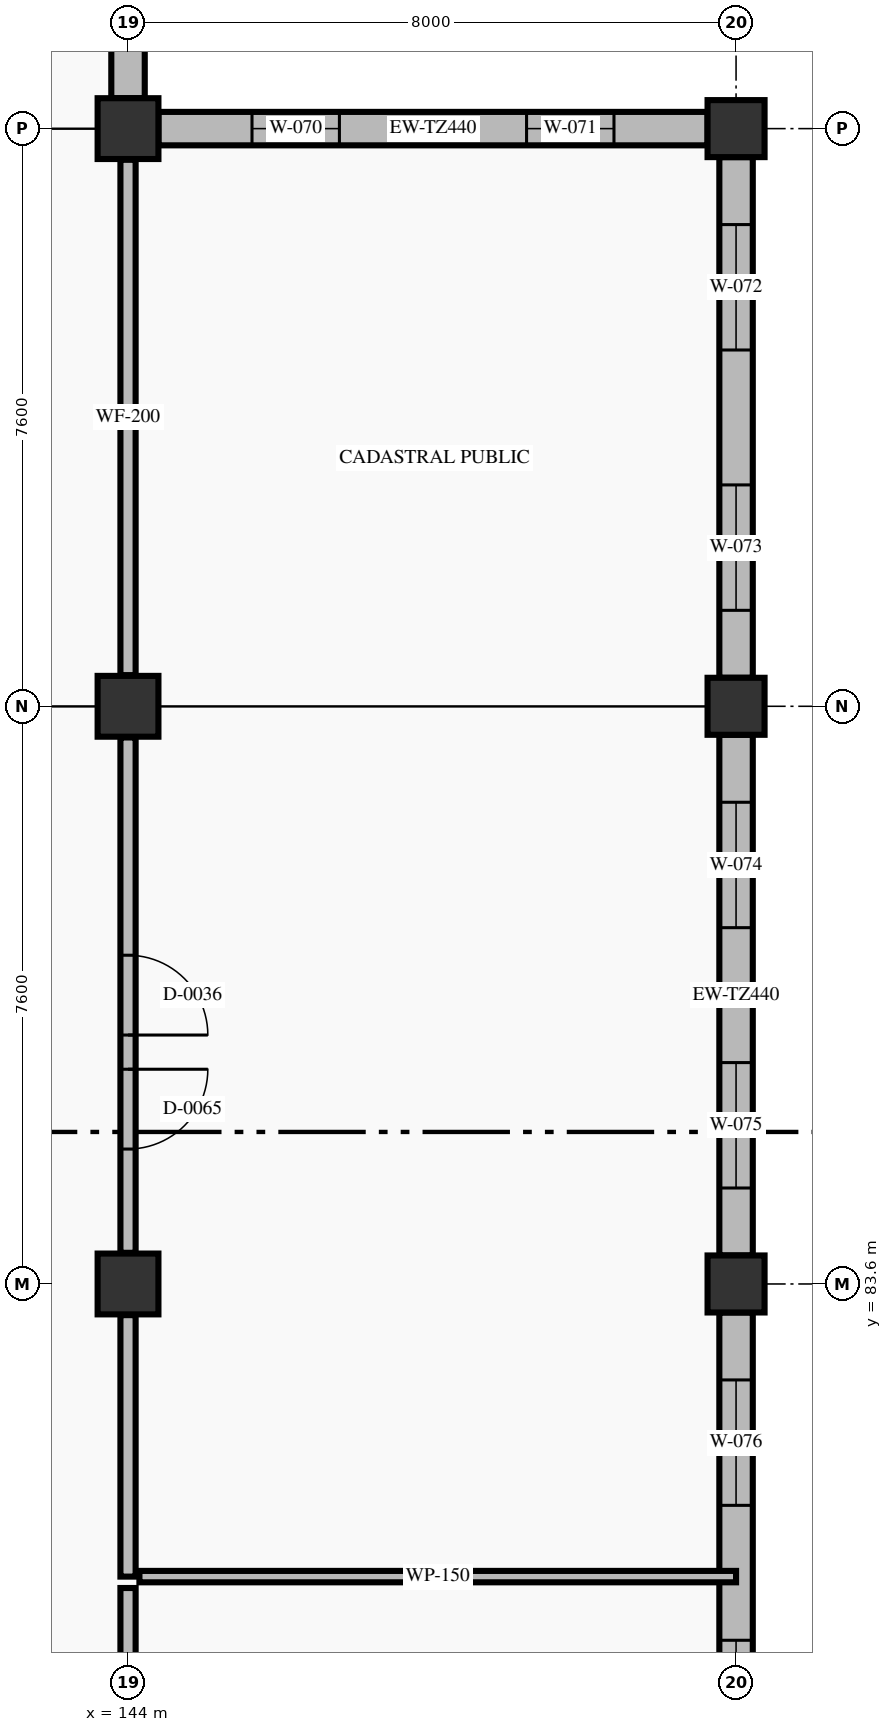
"""IFC4 building model, lengths in metres.
Left out: names, types, materials, properties, quantities, classifications, styles, units other than length and angle.
Written with IfcOpenShell. Run it as: python <this file> out.ifc"""

import sys

from ifc_helpers import new_model, si_unit, direction, frame, frame_2d, origin, origin_2d, place, context, subcontext, project, spatial, rectangle, extrude, element, fill, save


model = new_model("IFC4")
c1 = context("Model", 3, precision=1e-05, world=origin(), true_north=direction((0.0, 1.0)))
c2 = subcontext(c1, "Body", "Model", "MODEL_VIEW")
j1 = project(units=[si_unit("LENGTHUNIT", "METRE"), si_unit("PLANEANGLEUNIT", "RADIAN")], contexts=[c1])
p1 = place(None, origin())
s1 = spatial("IfcSite", under=j1, at=p1, CompositionType="ELEMENT")
p2 = place(p1, origin())
s2 = spatial("IfcBuilding", under=s1, at=p2, CompositionType="ELEMENT")
p3 = place(p2, origin())
s3 = spatial("IfcBuildingStorey", under=s2, at=p3, CompositionType="ELEMENT", Elevation=0.0)
for number, where, z_axis, x_axis in (
    (1, (144.0, 83.6, 0.0), (0.0, 0.0, 1.0), (1.0, 0.0, 0.0)),
    (2, (144.0, 91.2, 0.0), (0.0, 0.0, 1.0), (1.0, 0.0, 0.0)),
    (3, (144.0, 98.8, 0.0), (0.0, 0.0, 1.0), (1.0, 0.0, 0.0)),
):
    element("IfcColumn", number, at=place(p3, frame(where, z_axis=z_axis, x_axis=x_axis)), inside=s3, PredefinedType="COLUMN", context=c2, shape_type="SweptSolid", body=[
        extrude(rectangle(XDim=0.8, YDim=0.8, at=origin_2d()), origin(), (0.0, 0.0, 1.0), 5.4),
    ])
for number, where, z_axis, x_axis in (
    (4, (152.0, 83.6, 0.0), (0.0, 0.0, 1.0), (1.0, 0.0, 0.0)),
    (5, (152.0, 91.2, 0.0), (0.0, 0.0, 1.0), (1.0, 0.0, 0.0)),
    (6, (152.0, 98.8, 0.0), (0.0, 0.0, 1.0), (1.0, 0.0, 0.0)),
):
    element("IfcColumn", number, at=place(p3, frame(where, z_axis=z_axis, x_axis=x_axis)), inside=s3, PredefinedType="COLUMN", context=c2, shape_type="SweptSolid", body=[
        extrude(rectangle(XDim=0.75, YDim=0.75, at=origin_2d()), origin(), (0.0, 0.0, 1.0), 5.4),
    ])
p4 = place(p3, frame((144.0, 106.025, 0.0), z_axis=(0.0, 0.0, 1.0), x_axis=(0.0, -1.0, 0.0)))
e7 = element("IfcWall", 7, at=p4, inside=s3, PredefinedType="STANDARD", context=c2, shape_type="SweptSolid", body=[
    extrude(rectangle(XDim=6.825, YDim=0.44, at=frame_2d((3.413, 0.0))), origin(), (0.0, 0.0, 1.0), 4.46),
])
p5 = place(p4, frame((0.881, 0.0, 0.9)))
e8 = element("IfcOpeningElement", 8, at=p5, cuts=e7, PredefinedType="OPENING", context=c2, shape_type="SweptSolid", body=[
    extrude(rectangle(XDim=1.65, YDim=2.6, at=frame_2d((0.825, 1.3))), frame((0.0, 0.23, 0.0), z_axis=(0.0, -1.0, 0.0), x_axis=(1.0, 0.0, 0.0)), (0.0, 0.0, 1.0), 0.46),
])
p6 = place(p4, frame((4.294, 0.0, 0.9)))
e9 = element("IfcOpeningElement", 9, at=p6, cuts=e7, PredefinedType="OPENING", context=c2, shape_type="SweptSolid", body=[
    extrude(rectangle(XDim=1.65, YDim=2.6, at=frame_2d((0.825, 1.3))), frame((0.0, 0.23, 0.0), z_axis=(0.0, -1.0, 0.0), x_axis=(1.0, 0.0, 0.0)), (0.0, 0.0, 1.0), 0.46),
])
p7 = place(p3, frame((144.4, 98.8, 0.0), z_axis=(0.0, 0.0, 1.0), x_axis=(1.0, 0.0, 0.0)))
e10 = element("IfcWall", 10, at=p7, inside=s3, PredefinedType="STANDARD", context=c2, shape_type="SweptSolid", body=[
    extrude(rectangle(XDim=7.225, YDim=0.44, at=frame_2d((3.613, 0.0))), origin(), (0.0, 0.0, 1.0), 4.56),
])
p8 = place(p7, frame((1.231, 0.0, 1.05)))
e11 = element("IfcOpeningElement", 11, at=p8, cuts=e10, PredefinedType="OPENING", context=c2, shape_type="SweptSolid", body=[
    extrude(rectangle(XDim=1.15, YDim=1.65, at=frame_2d((0.575, 0.825))), frame((0.0, 0.23, 0.0), z_axis=(0.0, -1.0, 0.0), x_axis=(1.0, 0.0, 0.0)), (0.0, 0.0, 1.0), 0.46),
])
p9 = place(p7, frame((4.844, 0.0, 1.05)))
e12 = element("IfcOpeningElement", 12, at=p9, cuts=e10, PredefinedType="OPENING", context=c2, shape_type="SweptSolid", body=[
    extrude(rectangle(XDim=1.15, YDim=1.65, at=frame_2d((0.575, 0.825))), frame((0.0, 0.23, 0.0), z_axis=(0.0, -1.0, 0.0), x_axis=(1.0, 0.0, 0.0)), (0.0, 0.0, 1.0), 0.46),
])
p10 = place(p3, frame((152.0, 98.425, 0.0), z_axis=(0.0, 0.0, 1.0), x_axis=(0.0, -1.0, 0.0)))
e13 = element("IfcWall", 13, at=p10, inside=s3, PredefinedType="STANDARD", context=c2, shape_type="SweptSolid", body=[
    extrude(rectangle(XDim=6.85, YDim=0.44, at=frame_2d((3.425, 0.0))), origin(), (0.0, 0.0, 1.0), 4.46),
])
p11 = place(p10, frame((0.887, 0.0, 0.9)))
e14 = element("IfcOpeningElement", 14, at=p11, cuts=e13, PredefinedType="OPENING", context=c2, shape_type="SweptSolid", body=[
    extrude(rectangle(XDim=1.65, YDim=2.6, at=frame_2d((0.825, 1.3))), frame((0.0, 0.23, 0.0), z_axis=(0.0, -1.0, 0.0), x_axis=(1.0, 0.0, 0.0)), (0.0, 0.0, 1.0), 0.46),
])
p12 = place(p10, frame((4.312, 0.0, 0.9)))
e15 = element("IfcOpeningElement", 15, at=p12, cuts=e13, PredefinedType="OPENING", context=c2, shape_type="SweptSolid", body=[
    extrude(rectangle(XDim=1.65, YDim=2.6, at=frame_2d((0.825, 1.3))), frame((0.0, 0.23, 0.0), z_axis=(0.0, -1.0, 0.0), x_axis=(1.0, 0.0, 0.0)), (0.0, 0.0, 1.0), 0.46),
])
p13 = place(p3, frame((152.0, 90.825, 0.0), z_axis=(0.0, 0.0, 1.0), x_axis=(0.0, -1.0, 0.0)))
e16 = element("IfcWall", 16, at=p13, inside=s3, PredefinedType="STANDARD", context=c2, shape_type="SweptSolid", body=[
    extrude(rectangle(XDim=6.85, YDim=0.44, at=frame_2d((3.425, 0.0))), origin(), (0.0, 0.0, 1.0), 4.46),
])
p14 = place(p13, frame((0.887, 0.0, 0.9)))
e17 = element("IfcOpeningElement", 17, at=p14, cuts=e16, PredefinedType="OPENING", context=c2, shape_type="SweptSolid", body=[
    extrude(rectangle(XDim=1.65, YDim=2.6, at=frame_2d((0.825, 1.3))), frame((0.0, 0.23, 0.0), z_axis=(0.0, -1.0, 0.0), x_axis=(1.0, 0.0, 0.0)), (0.0, 0.0, 1.0), 0.46),
])
p15 = place(p13, frame((4.312, 0.0, 0.9)))
e18 = element("IfcOpeningElement", 18, at=p15, cuts=e16, PredefinedType="OPENING", context=c2, shape_type="SweptSolid", body=[
    extrude(rectangle(XDim=1.65, YDim=2.6, at=frame_2d((0.825, 1.3))), frame((0.0, 0.23, 0.0), z_axis=(0.0, -1.0, 0.0), x_axis=(1.0, 0.0, 0.0)), (0.0, 0.0, 1.0), 0.46),
])
p16 = place(p3, frame((152.0, 83.225, 0.0), z_axis=(0.0, 0.0, 1.0), x_axis=(0.0, -1.0, 0.0)))
e19 = element("IfcWall", 19, at=p16, inside=s3, PredefinedType="STANDARD", context=c2, shape_type="SweptSolid", body=[
    extrude(rectangle(XDim=6.85, YDim=0.44, at=frame_2d((3.425, 0.0))), origin(), (0.0, 0.0, 1.0), 4.46),
])
p17 = place(p16, frame((0.887, 0.0, 0.9)))
e20 = element("IfcOpeningElement", 20, at=p17, cuts=e19, PredefinedType="OPENING", context=c2, shape_type="SweptSolid", body=[
    extrude(rectangle(XDim=1.65, YDim=2.6, at=frame_2d((0.825, 1.3))), frame((0.0, 0.23, 0.0), z_axis=(0.0, -1.0, 0.0), x_axis=(1.0, 0.0, 0.0)), (0.0, 0.0, 1.0), 0.46),
])
p18 = place(p16, frame((4.312, 0.0, 0.9)))
e21 = element("IfcOpeningElement", 21, at=p18, cuts=e19, PredefinedType="OPENING", context=c2, shape_type="SweptSolid", body=[
    extrude(rectangle(XDim=1.65, YDim=2.6, at=frame_2d((0.825, 1.3))), frame((0.0, 0.23, 0.0), z_axis=(0.0, -1.0, 0.0), x_axis=(1.0, 0.0, 0.0)), (0.0, 0.0, 1.0), 0.46),
])
p19 = place(p3, frame((144.0, 98.39, 0.0), z_axis=(0.0, 0.0, 1.0), x_axis=(0.0, -1.0, 0.0)))
e22 = element("IfcWall", 22, at=p19, inside=s3, PredefinedType="STANDARD", context=c2, shape_type="SweptSolid", body=[
    extrude(rectangle(XDim=6.78, YDim=0.2, at=frame_2d((3.39, 0.0))), origin(), (0.0, 0.0, 1.0), 4.46),
])
p20 = place(p3, frame((144.0, 90.79, 0.0), z_axis=(0.0, 0.0, 1.0), x_axis=(0.0, -1.0, 0.0)))
e23 = element("IfcWall", 23, at=p20, inside=s3, PredefinedType="STANDARD", context=c2, shape_type="SweptSolid", body=[
    extrude(rectangle(XDim=6.78, YDim=0.2, at=frame_2d((3.39, 0.0))), origin(), (0.0, 0.0, 1.0), 4.46),
])
p21 = place(p20, frame((2.865, 0.0, 0.0)))
e24 = element("IfcOpeningElement", 24, at=p21, cuts=e23, PredefinedType="OPENING", context=c2, shape_type="SweptSolid", body=[
    extrude(rectangle(XDim=1.05, YDim=2.15, at=frame_2d((0.525, 1.075))), frame((0.0, 0.11, 0.0), z_axis=(0.0, -1.0, 0.0), x_axis=(1.0, 0.0, 0.0)), (0.0, 0.0, 1.0), 0.22),
])
p22 = place(p20, frame((4.365, 0.0, 0.0)))
e25 = element("IfcOpeningElement", 25, at=p22, cuts=e23, PredefinedType="OPENING", context=c2, shape_type="SweptSolid", body=[
    extrude(rectangle(XDim=1.05, YDim=2.15, at=frame_2d((0.525, 1.075))), frame((0.0, 0.11, 0.0), z_axis=(0.0, -1.0, 0.0), x_axis=(1.0, 0.0, 0.0)), (0.0, 0.0, 1.0), 0.22),
])
p23 = place(p3, frame((144.0, 83.19, 0.0), z_axis=(0.0, 0.0, 1.0), x_axis=(0.0, -1.0, 0.0)))
e26 = element("IfcWall", 26, at=p23, inside=s3, PredefinedType="STANDARD", context=c2, shape_type="SweptSolid", body=[
    extrude(rectangle(XDim=3.44, YDim=0.2, at=frame_2d((1.72, 0.0))), origin(), (0.0, 0.0, 1.0), 4.46),
])
p24 = place(p3, frame((144.0, 79.6, 0.0), z_axis=(0.0, 0.0, 1.0), x_axis=(0.0, -1.0, 0.0)))
e27 = element("IfcWall", 27, at=p24, inside=s3, PredefinedType="STANDARD", context=c2, shape_type="SweptSolid", body=[
    extrude(rectangle(XDim=3.19, YDim=0.2, at=frame_2d((1.595, 0.0))), origin(), (0.0, 0.0, 1.0), 4.46),
])
p25 = place(p24, frame((1.07, 0.0, 0.0)))
e28 = element("IfcOpeningElement", 28, at=p25, cuts=e27, PredefinedType="OPENING", context=c2, shape_type="SweptSolid", body=[
    extrude(rectangle(XDim=1.05, YDim=2.15, at=frame_2d((0.525, 1.075))), frame((0.0, 0.11, 0.0), z_axis=(0.0, -1.0, 0.0), x_axis=(1.0, 0.0, 0.0)), (0.0, 0.0, 1.0), 0.22),
])
p26 = place(p3, frame((152.0, 79.75, 0.0), z_axis=(0.0, 0.0, 1.0), x_axis=(-1.0, 0.0, 0.0)))
e29 = element("IfcWall", 29, at=p26, inside=s3, PredefinedType="PARTITIONING", context=c2, shape_type="SweptSolid", body=[
    extrude(rectangle(XDim=7.85, YDim=0.15, at=frame_2d((3.925, 0.0))), origin(), (0.0, 0.0, 1.0), 5.16),
])
p27 = place(p8, origin())
e30 = element("IfcWindow", 30, at=p27, inside=s3, PartitioningType="SINGLE_PANEL", PredefinedType="WINDOW", context=c2, shape_type="SweptSolid", body=[
    extrude(rectangle(XDim=1.15, YDim=1.65, at=frame_2d((0.575, 0.825))), frame((0.0, 0.03, 0.0), z_axis=(0.0, -1.0, 0.0), x_axis=(1.0, 0.0, 0.0)), (0.0, 0.0, 1.0), 0.06),
])
fill(e11, e30)
p28 = place(p9, origin())
e31 = element("IfcWindow", 31, at=p28, inside=s3, PartitioningType="SINGLE_PANEL", PredefinedType="WINDOW", context=c2, shape_type="SweptSolid", body=[
    extrude(rectangle(XDim=1.15, YDim=1.65, at=frame_2d((0.575, 0.825))), frame((0.0, 0.03, 0.0), z_axis=(0.0, -1.0, 0.0), x_axis=(1.0, 0.0, 0.0)), (0.0, 0.0, 1.0), 0.06),
])
fill(e12, e31)
p29 = place(p11, origin())
e32 = element("IfcWindow", 32, at=p29, inside=s3, PartitioningType="DOUBLE_PANEL_VERTICAL", PredefinedType="WINDOW", context=c2, shape_type="SweptSolid", body=[
    extrude(rectangle(XDim=1.65, YDim=2.6, at=frame_2d((0.825, 1.3))), frame((0.0, 0.03, 0.0), z_axis=(0.0, -1.0, 0.0), x_axis=(1.0, 0.0, 0.0)), (0.0, 0.0, 1.0), 0.06),
])
fill(e14, e32)
p30 = place(p12, origin())
e33 = element("IfcWindow", 33, at=p30, inside=s3, PartitioningType="DOUBLE_PANEL_VERTICAL", PredefinedType="WINDOW", context=c2, shape_type="SweptSolid", body=[
    extrude(rectangle(XDim=1.65, YDim=2.6, at=frame_2d((0.825, 1.3))), frame((0.0, 0.03, 0.0), z_axis=(0.0, -1.0, 0.0), x_axis=(1.0, 0.0, 0.0)), (0.0, 0.0, 1.0), 0.06),
])
fill(e15, e33)
p31 = place(p14, origin())
e34 = element("IfcWindow", 34, at=p31, inside=s3, PartitioningType="DOUBLE_PANEL_VERTICAL", PredefinedType="WINDOW", context=c2, shape_type="SweptSolid", body=[
    extrude(rectangle(XDim=1.65, YDim=2.6, at=frame_2d((0.825, 1.3))), frame((0.0, 0.03, 0.0), z_axis=(0.0, -1.0, 0.0), x_axis=(1.0, 0.0, 0.0)), (0.0, 0.0, 1.0), 0.06),
])
fill(e17, e34)
p32 = place(p15, origin())
e35 = element("IfcWindow", 35, at=p32, inside=s3, PartitioningType="DOUBLE_PANEL_VERTICAL", PredefinedType="WINDOW", context=c2, shape_type="SweptSolid", body=[
    extrude(rectangle(XDim=1.65, YDim=2.6, at=frame_2d((0.825, 1.3))), frame((0.0, 0.03, 0.0), z_axis=(0.0, -1.0, 0.0), x_axis=(1.0, 0.0, 0.0)), (0.0, 0.0, 1.0), 0.06),
])
fill(e18, e35)
p33 = place(p17, origin())
e36 = element("IfcWindow", 36, at=p33, inside=s3, PartitioningType="DOUBLE_PANEL_VERTICAL", PredefinedType="WINDOW", context=c2, shape_type="SweptSolid", body=[
    extrude(rectangle(XDim=1.65, YDim=2.6, at=frame_2d((0.825, 1.3))), frame((0.0, 0.03, 0.0), z_axis=(0.0, -1.0, 0.0), x_axis=(1.0, 0.0, 0.0)), (0.0, 0.0, 1.0), 0.06),
])
fill(e20, e36)
p34 = place(p18, origin())
e37 = element("IfcWindow", 37, at=p34, inside=s3, PartitioningType="DOUBLE_PANEL_VERTICAL", PredefinedType="WINDOW", context=c2, shape_type="SweptSolid", body=[
    extrude(rectangle(XDim=1.65, YDim=2.6, at=frame_2d((0.825, 1.3))), frame((0.0, 0.03, 0.0), z_axis=(0.0, -1.0, 0.0), x_axis=(1.0, 0.0, 0.0)), (0.0, 0.0, 1.0), 0.06),
])
fill(e21, e37)
p35 = place(p21, origin())
e38 = element("IfcDoor", 38, at=p35, inside=s3, OperationType="SINGLE_SWING_RIGHT", PredefinedType="DOOR", context=c2, shape_type="SweptSolid", body=[
    extrude(rectangle(XDim=1.05, YDim=2.15, at=frame_2d((0.525, 1.075))), frame((0.0, 0.025, 0.0), z_axis=(0.0, -1.0, 0.0), x_axis=(1.0, 0.0, 0.0)), (0.0, 0.0, 1.0), 0.05),
])
fill(e24, e38)
p36 = place(p22, origin())
e39 = element("IfcDoor", 39, at=p36, inside=s3, OperationType="SINGLE_SWING_LEFT", PredefinedType="DOOR", context=c2, shape_type="SweptSolid", body=[
    extrude(rectangle(XDim=1.05, YDim=2.15, at=frame_2d((0.525, 1.075))), frame((0.0, 0.025, 0.0), z_axis=(0.0, -1.0, 0.0), x_axis=(1.0, 0.0, 0.0)), (0.0, 0.0, 1.0), 0.05),
])
fill(e25, e39)
save(model, sys.argv[1])
